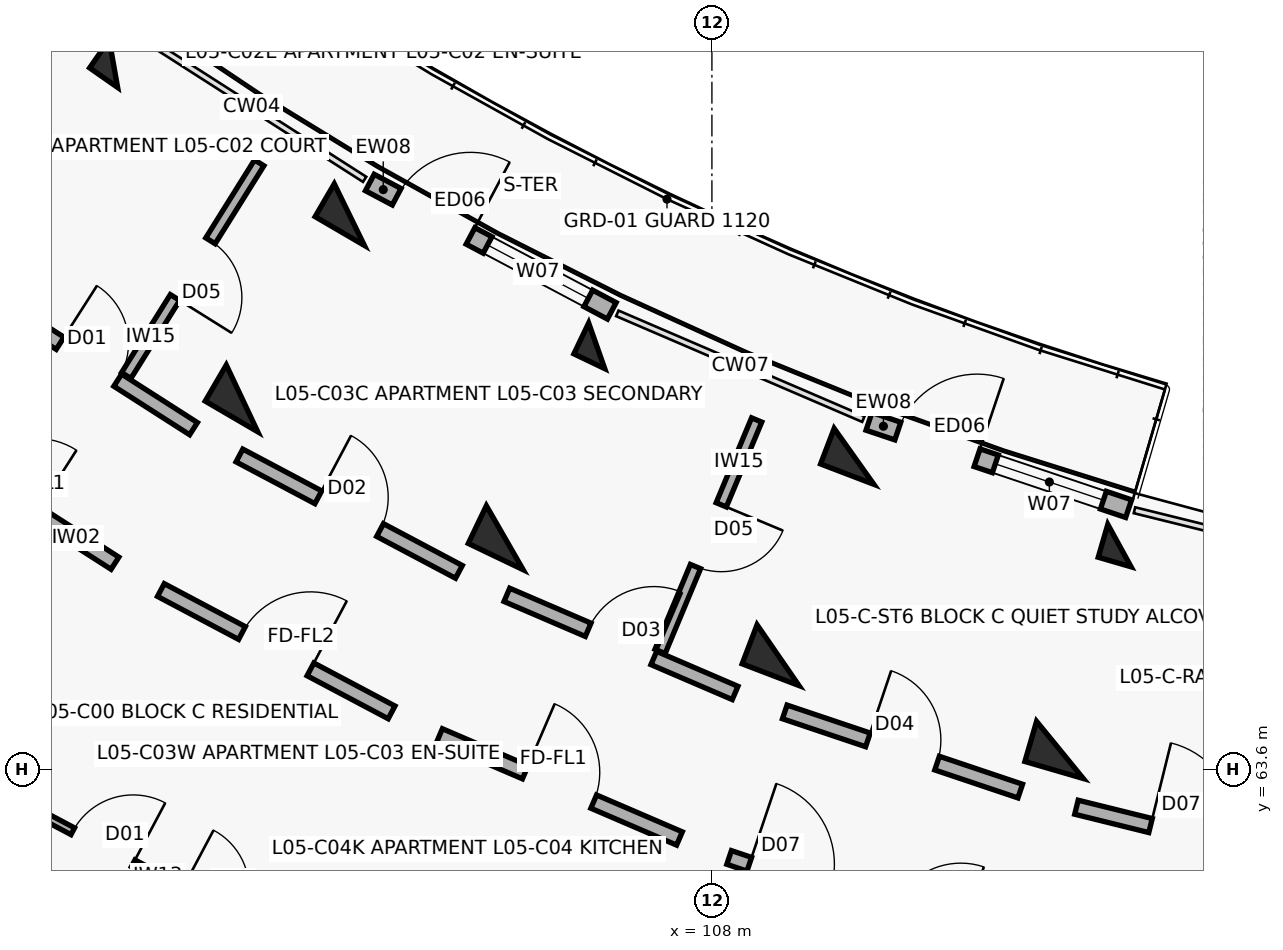
"""IFC4 building model, lengths in metres.
Left out: names, types, materials, properties, quantities, classifications, styles, units other than length and angle.
Written with IfcOpenShell. Run it as: python <this file> out.ifc"""

import sys

from ifc_helpers import new_model, si_unit, direction, frame, frame_2d, origin, origin_2d, place, context, subcontext, project, spatial, rectangle, extrude, element, fill, save


model = new_model("IFC4")
c1 = context("Model", 3, precision=1e-05, world=origin(), true_north=direction((0.0, 1.0)))
c2 = subcontext(c1, "Body", "Model", "MODEL_VIEW")
j1 = project(units=[si_unit("LENGTHUNIT", "METRE"), si_unit("PLANEANGLEUNIT", "RADIAN")], contexts=[c1])
p1 = place(None, origin())
s1 = spatial("IfcSite", under=j1, at=p1, CompositionType="ELEMENT")
p2 = place(p1, origin())
s2 = spatial("IfcBuilding", under=s1, at=p2, CompositionType="ELEMENT")
p3 = place(p2, frame((0.0, 0.0, 17.4)))
s3 = spatial("IfcBuildingStorey", under=s2, at=p3, CompositionType="ELEMENT", Elevation=17.4)
p4 = place(p3, frame((100.126, 72.882, 0.0), z_axis=(0.0, 0.0, 1.0), x_axis=(-0.573004420611, -0.819552276527, 0.0)))
e1 = element("IfcColumn", 1, at=p4, inside=s3, PredefinedType="COLUMN", context=c2, shape_type="SweptSolid", body=[
    extrude(rectangle(XDim=0.45, YDim=0.45, at=origin_2d()), origin(), (0.0, 0.0, 1.0), 3.1),
])
p5 = place(p3, frame((103.229, 70.896, 0.0), z_axis=(0.0, 0.0, 1.0), x_axis=(-0.504226211181, -0.863571611366, 0.0)))
e2 = element("IfcColumn", 2, at=p5, inside=s3, PredefinedType="COLUMN", context=c2, shape_type="SweptSolid", body=[
    extrude(rectangle(XDim=0.5, YDim=0.75, at=origin_2d()), origin(), (0.0, 0.0, 1.0), 3.1),
])
for number, where, z_axis, x_axis in (
    (3, (101.817, 68.478, 0.0), (0.0, 0.0, 1.0), (-0.504, -0.864, 0.0)),
    (4, (98.853, 63.4, 0.0), (0.0, 0.0, 1.0), (-0.504, -0.864, 0.0)),
):
    element("IfcColumn", number, at=place(p3, frame(where, z_axis=z_axis, x_axis=x_axis)), inside=s3, PredefinedType="COLUMN", context=c2, shape_type="SweptSolid", body=[
        extrude(rectangle(XDim=0.55, YDim=0.8, at=origin_2d()), origin(), (0.0, 0.0, 1.0), 3.1),
    ])
p6 = place(p3, frame((106.484, 69.169, 0.0), z_axis=(0.0, 0.0, 1.0), x_axis=(-0.432085748802, -0.901832526405, 0.0)))
e5 = element("IfcColumn", 5, at=p6, inside=s3, PredefinedType="COLUMN", context=c2, shape_type="SweptSolid", body=[
    extrude(rectangle(XDim=0.45, YDim=0.45, at=origin_2d()), origin(), (0.0, 0.0, 1.0), 3.1),
])
p7 = place(p3, frame((105.274, 66.644, 0.0), z_axis=(0.0, 0.0, 1.0), x_axis=(-0.432085748802, -0.901832526405, 0.0)))
e6 = element("IfcColumn", 6, at=p7, inside=s3, PredefinedType="COLUMN", context=c2, shape_type="SweptSolid", body=[
    extrude(rectangle(XDim=0.55, YDim=0.8, at=origin_2d()), origin(), (0.0, 0.0, 1.0), 3.1),
])
p8 = place(p3, frame((109.869, 67.714, 0.0), z_axis=(0.0, 0.0, 1.0), x_axis=(-0.357064076459, -0.934079892355, 0.0)))
e7 = element("IfcColumn", 7, at=p8, inside=s3, PredefinedType="COLUMN", context=c2, shape_type="SweptSolid", body=[
    extrude(rectangle(XDim=0.5, YDim=0.75, at=origin_2d()), origin(), (0.0, 0.0, 1.0), 3.1),
])
p9 = place(p3, frame((108.869, 65.099, 0.0), z_axis=(0.0, 0.0, 1.0), x_axis=(-0.357064076459, -0.934079892355, 0.0)))
e8 = element("IfcColumn", 8, at=p9, inside=s3, PredefinedType="COLUMN", context=c2, shape_type="SweptSolid", body=[
    extrude(rectangle(XDim=0.55, YDim=0.8, at=origin_2d()), origin(), (0.0, 0.0, 1.0), 3.1),
])
p10 = place(p3, frame((113.362, 66.54, 0.0), z_axis=(0.0, 0.0, 1.0), x_axis=(-0.27966144946, -0.96009867914, 0.0)))
e9 = element("IfcColumn", 9, at=p10, inside=s3, PredefinedType="COLUMN", context=c2, shape_type="SweptSolid", body=[
    extrude(rectangle(XDim=0.45, YDim=0.45, at=origin_2d()), origin(), (0.0, 0.0, 1.0), 3.1),
])
p11 = place(p3, frame((112.579, 63.852, 0.0), z_axis=(0.0, 0.0, 1.0), x_axis=(-0.27966144946, -0.96009867914, 0.0)))
e10 = element("IfcColumn", 10, at=p11, inside=s3, PredefinedType="COLUMN", context=c2, shape_type="SweptSolid", body=[
    extrude(rectangle(XDim=0.55, YDim=0.8, at=origin_2d()), origin(), (0.0, 0.0, 1.0), 3.1),
])
p12 = place(p3, frame((103.499, 71.318, 0.0), z_axis=(0.0, 0.0, 1.0), x_axis=(0.883438308286, -0.468547495407, 0.0)))
e11 = element("IfcWall", 11, at=p12, inside=s3, PredefinedType="SOLIDWALL", context=c2, shape_type="SweptSolid", body=[
    extrude(rectangle(XDim=3.604, YDim=0.245, at=frame_2d((1.802, 0.0))), origin(), (0.0, 0.0, 1.0), 2.25),
])
p13 = place(p12, frame((0.4, 0.0, 0.0)))
e12 = element("IfcOpeningElement", 12, at=p13, cuts=e11, PredefinedType="OPENING", context=c2, shape_type="SweptSolid", body=[
    extrude(rectangle(XDim=1.1, YDim=2.15, at=frame_2d((0.55, 1.075))), frame((0.0, 0.133, 0.0), z_axis=(0.0, -1.0, 0.0), x_axis=(1.0, 0.0, 0.0)), (0.0, 0.0, 1.0), 0.265),
])
p14 = place(p12, frame((1.754, 0.0, 0.35)))
e13 = element("IfcOpeningElement", 13, at=p14, cuts=e11, PredefinedType="OPENING", context=c2, shape_type="SweptSolid", body=[
    extrude(rectangle(XDim=1.5, YDim=1.65, at=frame_2d((0.75, 0.825))), frame((0.0, 0.133, 0.0), z_axis=(0.0, -1.0, 0.0), x_axis=(1.0, 0.0, 0.0)), (0.0, 0.0, 1.0), 0.265),
])
p15 = place(p3, frame((110.067, 68.175, 0.0), z_axis=(0.0, 0.0, 1.0), x_axis=(0.947887701822, -0.318604621332, 0.0)))
e14 = element("IfcWall", 14, at=p15, inside=s3, PredefinedType="SOLIDWALL", context=c2, shape_type="SweptSolid", body=[
    extrude(rectangle(XDim=3.604, YDim=0.245, at=frame_2d((1.802, 0.0))), origin(), (0.0, 0.0, 1.0), 2.25),
])
p16 = place(p15, frame((0.4, 0.0, 0.0)))
e15 = element("IfcOpeningElement", 15, at=p16, cuts=e14, PredefinedType="OPENING", context=c2, shape_type="SweptSolid", body=[
    extrude(rectangle(XDim=1.1, YDim=2.15, at=frame_2d((0.55, 1.075))), frame((0.0, 0.133, 0.0), z_axis=(0.0, -1.0, 0.0), x_axis=(1.0, 0.0, 0.0)), (0.0, 0.0, 1.0), 0.265),
])
p17 = place(p15, frame((1.754, 0.0, 0.35)))
e16 = element("IfcOpeningElement", 16, at=p17, cuts=e14, PredefinedType="OPENING", context=c2, shape_type="SweptSolid", body=[
    extrude(rectangle(XDim=1.5, YDim=1.65, at=frame_2d((0.75, 0.825))), frame((0.0, 0.133, 0.0), z_axis=(0.0, -1.0, 0.0), x_axis=(1.0, 0.0, 0.0)), (0.0, 0.0, 1.0), 0.265),
])
p18 = place(p3, frame((97.252, 68.161, 0.0), z_axis=(0.0, 0.0, 1.0), x_axis=(0.842289466461, -0.53902546757, 0.0)))
e17 = element("IfcWall", 17, at=p18, inside=s3, PredefinedType="SOLIDWALL", context=c2, shape_type="SweptSolid", body=[
    extrude(rectangle(XDim=3.436, YDim=0.19, at=frame_2d((1.718, 0.0))), origin(), (0.0, 0.0, 1.0), 2.08),
])
p19 = place(p18, frame((1.228, 0.0, 0.0)))
e18 = element("IfcOpeningElement", 18, at=p19, cuts=e17, PredefinedType="OPENING", context=c2, shape_type="SweptSolid", body=[
    extrude(rectangle(XDim=0.98, YDim=2.15, at=frame_2d((0.49, 1.075))), frame((0.0, 0.105, 0.0), z_axis=(0.0, -1.0, 0.0), x_axis=(1.0, 0.0, 0.0)), (0.0, 0.0, 1.0), 0.21),
])
p20 = place(p3, frame((98.427, 69.841, 0.0), z_axis=(0.0, 0.0, 1.0), x_axis=(0.842280895761, -0.539038860043, 0.0)))
e19 = element("IfcWall", 19, at=p20, inside=s3, PredefinedType="SOLIDWALL", context=c2, shape_type="SweptSolid", body=[
    extrude(rectangle(XDim=3.269, YDim=0.19, at=frame_2d((1.634, 0.0))), origin(), (0.0, 0.0, 1.0), 2.08),
])
p21 = place(p20, frame((1.184, 0.0, 0.0)))
e20 = element("IfcOpeningElement", 20, at=p21, cuts=e19, PredefinedType="OPENING", context=c2, shape_type="SweptSolid", body=[
    extrude(rectangle(XDim=0.9, YDim=2.1, at=frame_2d((0.45, 1.05))), frame((0.0, 0.105, 0.0), z_axis=(0.0, -1.0, 0.0), x_axis=(1.0, 0.0, 0.0)), (0.0, 0.0, 1.0), 0.21),
])
p22 = place(p3, frame((102.044, 71.577, 0.0), z_axis=(0.0, 0.0, 1.0), x_axis=(-0.53015188203, -0.847902696057, 0.0)))
e21 = element("IfcWall", 21, at=p22, inside=s3, PredefinedType="PARTITIONING", context=c2, shape_type="SweptSolid", body=[
    extrude(rectangle(XDim=3.3, YDim=0.145, at=frame_2d((1.65, 0.0))), origin(), (0.0, 0.0, 1.0), 2.08),
])
p23 = place(p22, frame((1.21, 0.0, 0.0)))
e22 = element("IfcOpeningElement", 22, at=p23, cuts=e21, PredefinedType="OPENING", context=c2, shape_type="SweptSolid", body=[
    extrude(rectangle(XDim=0.88, YDim=2.1, at=frame_2d((0.44, 1.05))), frame((0.0, 0.083, 0.0), z_axis=(0.0, -1.0, 0.0), x_axis=(1.0, 0.0, 0.0)), (0.0, 0.0, 1.0), 0.165),
])
p24 = place(p3, frame((100.75, 65.956, 0.0), z_axis=(0.0, 0.0, 1.0), x_axis=(0.883440266101, -0.468543803963, 0.0)))
e23 = element("IfcWall", 23, at=p24, inside=s3, PredefinedType="SOLIDWALL", context=c2, shape_type="SweptSolid", body=[
    extrude(rectangle(XDim=3.436, YDim=0.19, at=frame_2d((1.718, 0.0))), origin(), (0.0, 0.0, 1.0), 2.08),
])
p25 = place(p24, frame((1.208, 0.0, 0.0)))
e24 = element("IfcOpeningElement", 24, at=p25, cuts=e23, PredefinedType="OPENING", context=c2, shape_type="SweptSolid", body=[
    extrude(rectangle(XDim=1.02, YDim=2.15, at=frame_2d((0.51, 1.075))), frame((0.0, 0.105, 0.0), z_axis=(0.0, -1.0, 0.0), x_axis=(1.0, 0.0, 0.0)), (0.0, 0.0, 1.0), 0.21),
])
p26 = place(p3, frame((101.784, 67.726, 0.0), z_axis=(0.0, 0.0, 1.0), x_axis=(0.883444301944, -0.468536194293, 0.0)))
e25 = element("IfcWall", 25, at=p26, inside=s3, PredefinedType="SOLIDWALL", context=c2, shape_type="SweptSolid", body=[
    extrude(rectangle(XDim=3.269, YDim=0.19, at=frame_2d((1.634, 0.0))), origin(), (0.0, 0.0, 1.0), 2.08),
])
p27 = place(p26, frame((1.174, 0.0, 0.0)))
e26 = element("IfcOpeningElement", 26, at=p27, cuts=e25, PredefinedType="OPENING", context=c2, shape_type="SweptSolid", body=[
    extrude(rectangle(XDim=0.92, YDim=2.1, at=frame_2d((0.46, 1.05))), frame((0.0, 0.105, 0.0), z_axis=(0.0, -1.0, 0.0), x_axis=(1.0, 0.0, 0.0)), (0.0, 0.0, 1.0), 0.21),
])
p28 = place(p3, frame((99.017, 63.087, 0.0), z_axis=(0.0, 0.0, 1.0), x_axis=(0.883415075746, -0.468591297342, 0.0)))
e27 = element("IfcWall", 27, at=p28, inside=s3, PredefinedType="PARTITIONING", context=c2, shape_type="SweptSolid", body=[
    extrude(rectangle(XDim=3.81, YDim=0.1, at=frame_2d((1.905, 0.0))), origin(), (0.0, 0.0, 1.0), 2.08),
])
p29 = place(p28, frame((0.65, 0.0, 0.0)))
e28 = element("IfcOpeningElement", 28, at=p29, cuts=e27, PredefinedType="OPENING", context=c2, shape_type="SweptSolid", body=[
    extrude(rectangle(XDim=0.9, YDim=2.1, at=frame_2d((0.45, 1.05))), frame((0.0, 0.06, 0.0), z_axis=(0.0, -1.0, 0.0), x_axis=(1.0, 0.0, 0.0)), (0.0, 0.0, 1.0), 0.12),
])
p30 = place(p28, frame((2.28, 0.0, 0.0)))
e29 = element("IfcOpeningElement", 29, at=p30, cuts=e27, PredefinedType="OPENING", context=c2, shape_type="SweptSolid", body=[
    extrude(rectangle(XDim=0.88, YDim=2.1, at=frame_2d((0.44, 1.05))), frame((0.0, 0.06, 0.0), z_axis=(0.0, -1.0, 0.0), x_axis=(1.0, 0.0, 0.0)), (0.0, 0.0, 1.0), 0.12),
])
p31 = place(p3, frame((104.417, 64.044, 0.0), z_axis=(0.0, 0.0, 1.0), x_axis=(0.918718172399, -0.394913813008, 0.0)))
e30 = element("IfcWall", 30, at=p31, inside=s3, PredefinedType="SOLIDWALL", context=c2, shape_type="SweptSolid", body=[
    extrude(rectangle(XDim=3.436, YDim=0.19, at=frame_2d((1.718, 0.0))), origin(), (0.0, 0.0, 1.0), 2.08),
])
p32 = place(p31, frame((1.228, 0.0, 0.0)))
e31 = element("IfcOpeningElement", 31, at=p32, cuts=e30, PredefinedType="OPENING", context=c2, shape_type="SweptSolid", body=[
    extrude(rectangle(XDim=0.98, YDim=2.15, at=frame_2d((0.49, 1.075))), frame((0.0, 0.105, 0.0), z_axis=(0.0, -1.0, 0.0), x_axis=(1.0, 0.0, 0.0)), (0.0, 0.0, 1.0), 0.21),
])
p33 = place(p3, frame((105.302, 65.893, 0.0), z_axis=(0.0, 0.0, 1.0), x_axis=(0.918723391052, -0.394901672235, 0.0)))
e32 = element("IfcWall", 32, at=p33, inside=s3, PredefinedType="SOLIDWALL", context=c2, shape_type="SweptSolid", body=[
    extrude(rectangle(XDim=3.269, YDim=0.19, at=frame_2d((1.634, 0.0))), origin(), (0.0, 0.0, 1.0), 2.08),
])
p34 = place(p33, frame((1.164, 0.0, 0.0)))
e33 = element("IfcOpeningElement", 33, at=p34, cuts=e32, PredefinedType="OPENING", context=c2, shape_type="SweptSolid", body=[
    extrude(rectangle(XDim=0.94, YDim=2.1, at=frame_2d((0.47, 1.05))), frame((0.0, 0.105, 0.0), z_axis=(0.0, -1.0, 0.0), x_axis=(1.0, 0.0, 0.0)), (0.0, 0.0, 1.0), 0.21),
])
p35 = place(p3, frame((108.589, 68.194, 0.0), z_axis=(0.0, 0.0, 1.0), x_axis=(-0.385151143297, -0.922853507777, 0.0)))
e34 = element("IfcWall", 34, at=p35, inside=s3, PredefinedType="PARTITIONING", context=c2, shape_type="SweptSolid", body=[
    extrude(rectangle(XDim=3.3, YDim=0.145, at=frame_2d((1.65, 0.0))), origin(), (0.0, 0.0, 1.0), 2.08),
])
p36 = place(p35, frame((1.21, 0.0, 0.0)))
e35 = element("IfcOpeningElement", 35, at=p36, cuts=e34, PredefinedType="OPENING", context=c2, shape_type="SweptSolid", body=[
    extrude(rectangle(XDim=0.88, YDim=2.1, at=frame_2d((0.44, 1.05))), frame((0.0, 0.083, 0.0), z_axis=(0.0, -1.0, 0.0), x_axis=(1.0, 0.0, 0.0)), (0.0, 0.0, 1.0), 0.165),
])
p37 = place(p3, frame((108.227, 62.437, 0.0), z_axis=(0.0, 0.0, 1.0), x_axis=(0.947884468821, -0.318614239745, 0.0)))
e36 = element("IfcWall", 36, at=p37, inside=s3, PredefinedType="SOLIDWALL", context=c2, shape_type="SweptSolid", body=[
    extrude(rectangle(XDim=3.436, YDim=0.19, at=frame_2d((1.718, 0.0))), origin(), (0.0, 0.0, 1.0), 2.08),
])
p38 = place(p37, frame((0.28, 0.0, 0.0)))
e37 = element("IfcOpeningElement", 37, at=p38, cuts=e36, PredefinedType="OPENING", context=c2, shape_type="SweptSolid", body=[
    extrude(rectangle(XDim=1.12, YDim=2.15, at=frame_2d((0.56, 1.075))), frame((0.0, 0.105, 0.0), z_axis=(0.0, -1.0, 0.0), x_axis=(1.0, 0.0, 0.0)), (0.0, 0.0, 1.0), 0.21),
])
p39 = place(p37, frame((2.266, 0.0, 0.0)))
e38 = element("IfcOpeningElement", 38, at=p39, cuts=e36, PredefinedType="OPENING", context=c2, shape_type="SweptSolid", body=[
    extrude(rectangle(XDim=0.95, YDim=2.1, at=frame_2d((0.475, 1.05))), frame((0.0, 0.105, 0.0), z_axis=(0.0, -1.0, 0.0), x_axis=(1.0, 0.0, 0.0)), (0.0, 0.0, 1.0), 0.21),
])
p40 = place(p3, frame((108.958, 64.352, 0.0), z_axis=(0.0, 0.0, 1.0), x_axis=(0.94787351033, -0.318646839643, 0.0)))
e39 = element("IfcWall", 39, at=p40, inside=s3, PredefinedType="SOLIDWALL", context=c2, shape_type="SweptSolid", body=[
    extrude(rectangle(XDim=3.269, YDim=0.19, at=frame_2d((1.634, 0.0))), origin(), (0.0, 0.0, 1.0), 2.08),
])
p41 = place(p40, frame((1.154, 0.0, 0.0)))
e40 = element("IfcOpeningElement", 40, at=p41, cuts=e39, PredefinedType="OPENING", context=c2, shape_type="SweptSolid", body=[
    extrude(rectangle(XDim=0.96, YDim=2.1, at=frame_2d((0.48, 1.05))), frame((0.0, 0.105, 0.0), z_axis=(0.0, -1.0, 0.0), x_axis=(1.0, 0.0, 0.0)), (0.0, 0.0, 1.0), 0.21),
])
p42 = place(p3, frame((112.796, 63.098, 0.0), z_axis=(0.0, 0.0, 1.0), x_axis=(0.970708998014, -0.240258280136, 0.0)))
e41 = element("IfcWall", 41, at=p42, inside=s3, PredefinedType="SOLIDWALL", context=c2, shape_type="SweptSolid", body=[
    extrude(rectangle(XDim=3.129, YDim=0.19, at=frame_2d((1.564, 0.0))), origin(), (0.0, 0.0, 1.0), 2.08),
])
p43 = place(p42, frame((1.004, 0.0, 0.0)))
e42 = element("IfcOpeningElement", 42, at=p43, cuts=e41, PredefinedType="OPENING", context=c2, shape_type="SweptSolid", body=[
    extrude(rectangle(XDim=1.12, YDim=2.15, at=frame_2d((0.56, 1.075))), frame((0.0, 0.105, 0.0), z_axis=(0.0, -1.0, 0.0), x_axis=(1.0, 0.0, 0.0)), (0.0, 0.0, 1.0), 0.21),
])
p44 = place(p13, origin())
e43 = element("IfcDoor", 43, at=p44, inside=s3, OperationType="SINGLE_SWING_RIGHT", PredefinedType="DOOR", context=c2, shape_type="SweptSolid", body=[
    extrude(rectangle(XDim=1.1, YDim=2.15, at=frame_2d((0.55, 1.075))), frame((0.0, 0.025, 0.0), z_axis=(0.0, -1.0, 0.0), x_axis=(1.0, 0.0, 0.0)), (0.0, 0.0, 1.0), 0.05),
])
fill(e12, e43)
p45 = place(p14, origin())
e44 = element("IfcWindow", 44, at=p45, inside=s3, PartitioningType="DOUBLE_PANEL_VERTICAL", PredefinedType="WINDOW", context=c2, shape_type="SweptSolid", body=[
    extrude(rectangle(XDim=1.5, YDim=1.65, at=frame_2d((0.75, 0.825))), frame((0.0, 0.03, 0.0), z_axis=(0.0, -1.0, 0.0), x_axis=(1.0, 0.0, 0.0)), (0.0, 0.0, 1.0), 0.06),
])
fill(e13, e44)
p46 = place(p16, origin())
e45 = element("IfcDoor", 45, at=p46, inside=s3, OperationType="SINGLE_SWING_RIGHT", PredefinedType="DOOR", context=c2, shape_type="SweptSolid", body=[
    extrude(rectangle(XDim=1.1, YDim=2.15, at=frame_2d((0.55, 1.075))), frame((0.0, 0.025, 0.0), z_axis=(0.0, -1.0, 0.0), x_axis=(1.0, 0.0, 0.0)), (0.0, 0.0, 1.0), 0.05),
])
fill(e15, e45)
p47 = place(p17, origin())
e46 = element("IfcWindow", 46, at=p47, inside=s3, PartitioningType="DOUBLE_PANEL_VERTICAL", PredefinedType="WINDOW", context=c2, shape_type="SweptSolid", body=[
    extrude(rectangle(XDim=1.5, YDim=1.65, at=frame_2d((0.75, 0.825))), frame((0.0, 0.03, 0.0), z_axis=(0.0, -1.0, 0.0), x_axis=(1.0, 0.0, 0.0)), (0.0, 0.0, 1.0), 0.06),
])
fill(e16, e46)
p48 = place(p21, origin())
e47 = element("IfcDoor", 47, at=p48, inside=s3, OperationType="SINGLE_SWING_LEFT", PredefinedType="DOOR", context=c2, shape_type="SweptSolid", body=[
    extrude(rectangle(XDim=0.9, YDim=2.1, at=frame_2d((0.45, 1.05))), frame((0.0, 0.025, 0.0), z_axis=(0.0, -1.0, 0.0), x_axis=(1.0, 0.0, 0.0)), (0.0, 0.0, 1.0), 0.05),
])
fill(e20, e47)
p49 = place(p23, origin())
e48 = element("IfcDoor", 48, at=p49, inside=s3, OperationType="SINGLE_SWING_RIGHT", PredefinedType="DOOR", context=c2, shape_type="SweptSolid", body=[
    extrude(rectangle(XDim=0.88, YDim=2.1, at=frame_2d((0.44, 1.05))), frame((0.0, 0.025, 0.0), z_axis=(0.0, -1.0, 0.0), x_axis=(1.0, 0.0, 0.0)), (0.0, 0.0, 1.0), 0.05),
])
fill(e22, e48)
p50 = place(p25, origin())
e49 = element("IfcDoor", 49, at=p50, inside=s3, OperationType="SINGLE_SWING_RIGHT", PredefinedType="DOOR", context=c2, shape_type="SweptSolid", body=[
    extrude(rectangle(XDim=1.02, YDim=2.15, at=frame_2d((0.51, 1.075))), frame((0.0, 0.025, 0.0), z_axis=(0.0, -1.0, 0.0), x_axis=(1.0, 0.0, 0.0)), (0.0, 0.0, 1.0), 0.05),
])
fill(e24, e49)
p51 = place(p27, origin())
e50 = element("IfcDoor", 50, at=p51, inside=s3, OperationType="SINGLE_SWING_LEFT", PredefinedType="DOOR", context=c2, shape_type="SweptSolid", body=[
    extrude(rectangle(XDim=0.92, YDim=2.1, at=frame_2d((0.46, 1.05))), frame((0.0, 0.025, 0.0), z_axis=(0.0, -1.0, 0.0), x_axis=(1.0, 0.0, 0.0)), (0.0, 0.0, 1.0), 0.05),
])
fill(e26, e50)
p52 = place(p29, origin())
e51 = element("IfcDoor", 51, at=p52, inside=s3, OperationType="SINGLE_SWING_RIGHT", PredefinedType="DOOR", context=c2, shape_type="SweptSolid", body=[
    extrude(rectangle(XDim=0.9, YDim=2.1, at=frame_2d((0.45, 1.05))), frame((0.0, 0.025, 0.0), z_axis=(0.0, -1.0, 0.0), x_axis=(1.0, 0.0, 0.0)), (0.0, 0.0, 1.0), 0.05),
])
fill(e28, e51)
p53 = place(p32, origin())
e52 = element("IfcDoor", 52, at=p53, inside=s3, OperationType="SINGLE_SWING_LEFT", PredefinedType="DOOR", context=c2, shape_type="SweptSolid", body=[
    extrude(rectangle(XDim=0.98, YDim=2.15, at=frame_2d((0.49, 1.075))), frame((0.0, 0.025, 0.0), z_axis=(0.0, -1.0, 0.0), x_axis=(1.0, 0.0, 0.0)), (0.0, 0.0, 1.0), 0.05),
])
fill(e31, e52)
p54 = place(p34, origin())
e53 = element("IfcDoor", 53, at=p54, inside=s3, OperationType="SINGLE_SWING_RIGHT", PredefinedType="DOOR", context=c2, shape_type="SweptSolid", body=[
    extrude(rectangle(XDim=0.94, YDim=2.1, at=frame_2d((0.47, 1.05))), frame((0.0, 0.025, 0.0), z_axis=(0.0, -1.0, 0.0), x_axis=(1.0, 0.0, 0.0)), (0.0, 0.0, 1.0), 0.05),
])
fill(e33, e53)
p55 = place(p36, origin())
e54 = element("IfcDoor", 54, at=p55, inside=s3, OperationType="SINGLE_SWING_LEFT", PredefinedType="DOOR", context=c2, shape_type="SweptSolid", body=[
    extrude(rectangle(XDim=0.88, YDim=2.1, at=frame_2d((0.44, 1.05))), frame((0.0, 0.025, 0.0), z_axis=(0.0, -1.0, 0.0), x_axis=(1.0, 0.0, 0.0)), (0.0, 0.0, 1.0), 0.05),
])
fill(e35, e54)
p56 = place(p38, origin())
e55 = element("IfcDoor", 55, at=p56, inside=s3, OperationType="SINGLE_SWING_LEFT", PredefinedType="DOOR", context=c2, shape_type="SweptSolid", body=[
    extrude(rectangle(XDim=1.12, YDim=2.15, at=frame_2d((0.56, 1.075))), frame((0.0, 0.025, 0.0), z_axis=(0.0, -1.0, 0.0), x_axis=(1.0, 0.0, 0.0)), (0.0, 0.0, 1.0), 0.05),
])
fill(e37, e55)
p57 = place(p41, origin())
e56 = element("IfcDoor", 56, at=p57, inside=s3, OperationType="SINGLE_SWING_LEFT", PredefinedType="DOOR", context=c2, shape_type="SweptSolid", body=[
    extrude(rectangle(XDim=0.96, YDim=2.1, at=frame_2d((0.48, 1.05))), frame((0.0, 0.025, 0.0), z_axis=(0.0, -1.0, 0.0), x_axis=(1.0, 0.0, 0.0)), (0.0, 0.0, 1.0), 0.05),
])
fill(e40, e56)
p58 = place(p43, origin())
e57 = element("IfcDoor", 57, at=p58, inside=s3, OperationType="SINGLE_SWING_LEFT", PredefinedType="DOOR", context=c2, shape_type="SweptSolid", body=[
    extrude(rectangle(XDim=1.12, YDim=2.15, at=frame_2d((0.56, 1.075))), frame((0.0, 0.025, 0.0), z_axis=(0.0, -1.0, 0.0), x_axis=(1.0, 0.0, 0.0)), (0.0, 0.0, 1.0), 0.05),
])
fill(e42, e57)
save(model, sys.argv[1])
